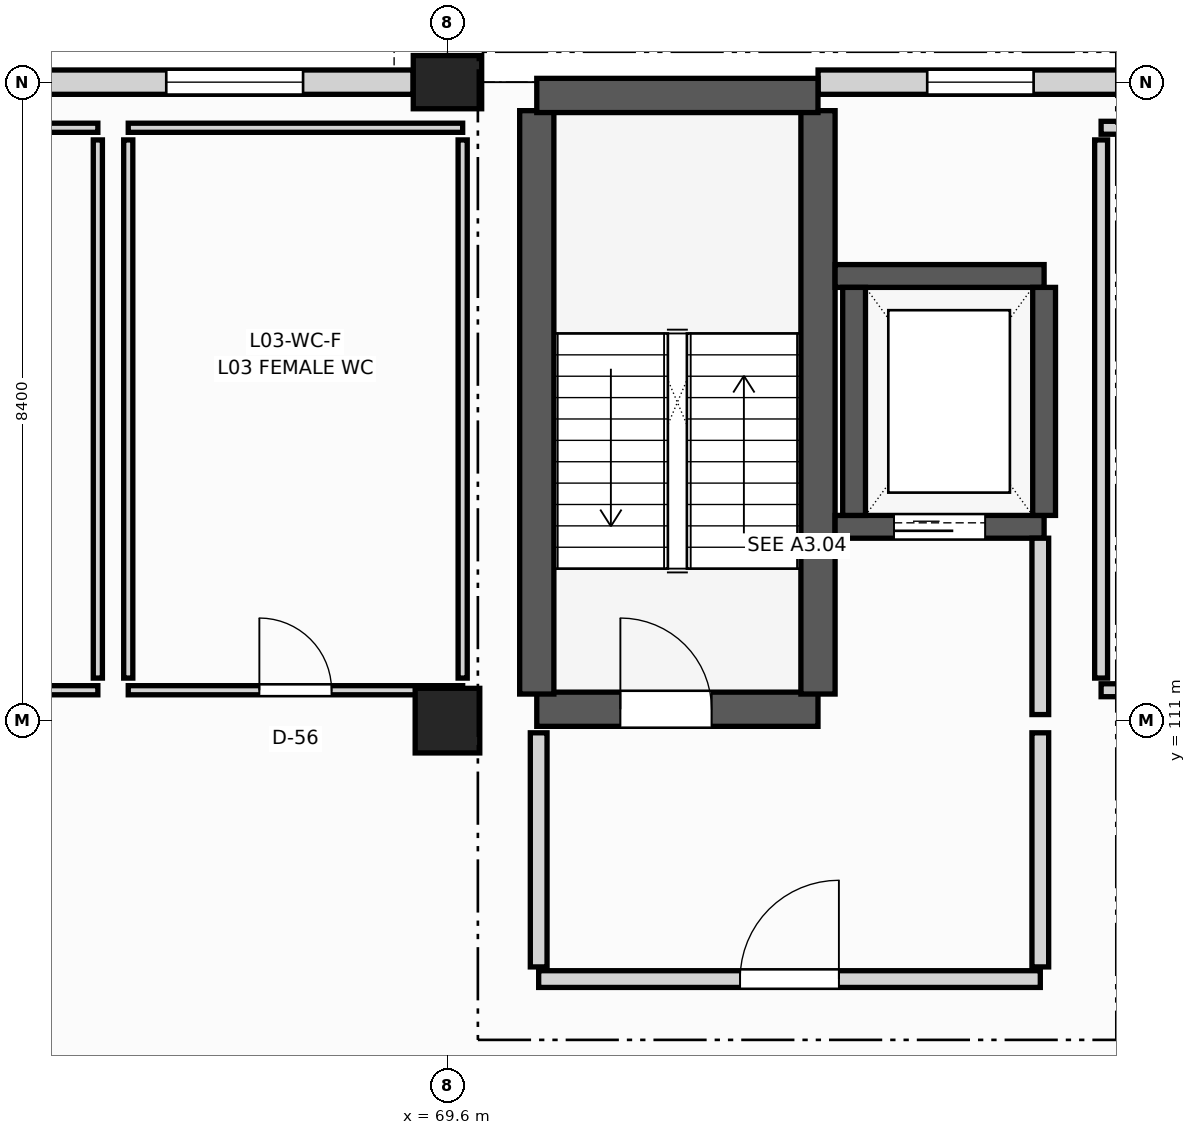
"""IFC4 building model, lengths in metres.
Left out: names, types, materials, properties, quantities, classifications, styles, units other than length and angle.
Written with IfcOpenShell. Run it as: python <this file> out.ifc"""

import sys

from ifc_helpers import new_model, si_unit, direction, frame, frame_2d, origin, origin_2d, place, context, subcontext, project, spatial, rectangle, extrude, element, fill, save


model = new_model("IFC4")
c1 = context("Model", 3, precision=1e-05, world=origin(), true_north=direction((0.0, 1.0)))
c2 = subcontext(c1, "Body", "Model", "MODEL_VIEW")
j1 = project(units=[si_unit("LENGTHUNIT", "METRE"), si_unit("PLANEANGLEUNIT", "RADIAN")], contexts=[c1])
p1 = place(None, origin())
s1 = spatial("IfcSite", under=j1, at=p1, CompositionType="ELEMENT")
p2 = place(p1, origin())
s2 = spatial("IfcBuilding", under=s1, at=p2, CompositionType="ELEMENT")
p3 = place(p2, frame((0.0, 0.0, 14.1)))
s3 = spatial("IfcBuildingStorey", under=s2, at=p3, CompositionType="ELEMENT", Elevation=14.1)
p4 = place(p3, frame((69.6, 111.0, 0.0), z_axis=(0.0, 0.0, 1.0), x_axis=(1.0, 0.0, 0.0)))
e1 = element("IfcColumn", 1, at=p4, inside=s3, PredefinedType="COLUMN", context=c2, shape_type="SweptSolid", body=[
    extrude(rectangle(XDim=0.85, YDim=0.85, at=origin_2d()), origin(), (0.0, 0.0, 1.0), 3.9),
])
p5 = place(p3, frame((69.6, 119.4, 0.0), z_axis=(0.0, 0.0, 1.0), x_axis=(1.0, 0.0, 0.0)))
e2 = element("IfcColumn", 2, at=p5, inside=s3, PredefinedType="COLUMN", context=c2, shape_type="SweptSolid", body=[
    extrude(rectangle(XDim=0.9, YDim=0.7, at=origin_2d()), origin(), (0.0, 0.0, 1.0), 3.9),
])
p6 = place(p3, frame((60.452, 119.4, 0.0), z_axis=(0.0, 0.0, 1.0), x_axis=(1.0, 0.0, 0.0)))
e3 = element("IfcWall", 3, at=p6, inside=s3, PredefinedType="SOLIDWALL", context=c2, shape_type="SweptSolid", body=[
    extrude(rectangle(XDim=8.696, YDim=0.32, at=frame_2d((4.348, 0.0))), origin(), (0.0, 0.0, 1.0), 3.08),
])
p7 = place(p6, frame((1.448, 0.0, 0.85)))
e4 = element("IfcOpeningElement", 4, at=p7, cuts=e3, PredefinedType="OPENING", context=c2, shape_type="SweptSolid", body=[
    extrude(rectangle(XDim=1.8, YDim=1.9, at=frame_2d((0.9, 0.95))), frame((0.0, 0.17, 0.0), z_axis=(0.0, -1.0, 0.0), x_axis=(1.0, 0.0, 0.0)), (0.0, 0.0, 1.0), 0.34),
])
p8 = place(p6, frame((5.448, 0.0, 0.85)))
e5 = element("IfcOpeningElement", 5, at=p8, cuts=e3, PredefinedType="OPENING", context=c2, shape_type="SweptSolid", body=[
    extrude(rectangle(XDim=1.8, YDim=1.9, at=frame_2d((0.9, 0.95))), frame((0.0, 0.17, 0.0), z_axis=(0.0, -1.0, 0.0), x_axis=(1.0, 0.0, 0.0)), (0.0, 0.0, 1.0), 0.34),
])
p9 = place(p3, frame((74.476, 119.4, 0.0), z_axis=(0.0, 0.0, 1.0), x_axis=(1.0, 0.0, 0.0)))
e6 = element("IfcWall", 6, at=p9, inside=s3, PredefinedType="SOLIDWALL", context=c2, shape_type="SweptSolid", body=[
    extrude(rectangle(XDim=4.272, YDim=0.32, at=frame_2d((2.136, 0.0))), origin(), (0.0, 0.0, 1.0), 3.08),
])
p10 = place(p9, frame((1.436, 0.0, 0.9)))
e7 = element("IfcOpeningElement", 7, at=p10, cuts=e6, PredefinedType="OPENING", context=c2, shape_type="SweptSolid", body=[
    extrude(rectangle(XDim=1.4, YDim=1.65, at=frame_2d((0.7, 0.825))), frame((0.0, 0.17, 0.0), z_axis=(0.0, -1.0, 0.0), x_axis=(1.0, 0.0, 0.0)), (0.0, 0.0, 1.0), 0.34),
])
p11 = place(p3, frame((70.775, 111.15, 0.0), z_axis=(0.0, 0.0, 1.0), x_axis=(1.0, 0.0, 0.0)))
e8 = element("IfcWall", 8, at=p11, inside=s3, PredefinedType="SHEAR", context=c2, shape_type="SweptSolid", body=[
    extrude(rectangle(XDim=3.7, YDim=0.45, at=frame_2d((1.85, 0.0))), origin(), (0.0, 0.0, 1.0), 3.9),
])
p12 = place(p11, frame((1.1, 0.0, 0.0)))
e9 = element("IfcOpeningElement", 9, at=p12, cuts=e8, PredefinedType="OPENING", context=c2, shape_type="SweptSolid", body=[
    extrude(rectangle(XDim=1.2, YDim=2.2, at=frame_2d((0.6, 1.1))), frame((0.0, 0.235, 0.0), z_axis=(0.0, -1.0, 0.0), x_axis=(1.0, 0.0, 0.0)), (0.0, 0.0, 1.0), 0.47),
])
for number, where, z_axis, x_axis in (
    (10, (70.775, 111.35, 0.0), (0.0, 0.0, 1.0), (0.0, 1.0, 0.0)),
    (11, (74.475, 111.35, 0.0), (0.0, 0.0, 1.0), (0.0, 1.0, 0.0)),
):
    element("IfcWall", number, at=place(p3, frame(where, z_axis=z_axis, x_axis=x_axis)), inside=s3, PredefinedType="SHEAR", context=c2, shape_type="SweptSolid", body=[
        extrude(rectangle(XDim=7.675, YDim=0.45, at=frame_2d((3.837, 0.0))), origin(), (0.0, 0.0, 1.0), 3.9),
    ])
p13 = place(p3, frame((70.775, 119.225, 0.0), z_axis=(0.0, 0.0, 1.0), x_axis=(1.0, 0.0, 0.0)))
e12 = element("IfcWall", 12, at=p13, inside=s3, PredefinedType="SHEAR", context=c2, shape_type="SweptSolid", body=[
    extrude(rectangle(XDim=3.7, YDim=0.45, at=frame_2d((1.85, 0.0))), origin(), (0.0, 0.0, 1.0), 3.9),
])
p14 = place(p3, frame((74.7, 113.55, 0.0), z_axis=(0.0, 0.0, 1.0), x_axis=(1.0, 0.0, 0.0)))
e13 = element("IfcWall", 13, at=p14, inside=s3, PredefinedType="SHEAR", context=c2, shape_type="SweptSolid", body=[
    extrude(rectangle(XDim=2.75, YDim=0.3, at=frame_2d((1.375, 0.0))), origin(), (0.0, 0.0, 1.0), 3.9),
])
p15 = place(p14, frame((0.775, 0.0, 0.0)))
e14 = element("IfcOpeningElement", 14, at=p15, cuts=e13, PredefinedType="OPENING", context=c2, shape_type="SweptSolid", body=[
    extrude(rectangle(XDim=1.2, YDim=2.2, at=frame_2d((0.6, 1.1))), frame((0.0, 0.16, 0.0), z_axis=(0.0, -1.0, 0.0), x_axis=(1.0, 0.0, 0.0)), (0.0, 0.0, 1.0), 0.32),
])
p16 = place(p3, frame((74.7, 116.85, 0.0), z_axis=(0.0, 0.0, 1.0), x_axis=(1.0, 0.0, 0.0)))
e15 = element("IfcWall", 15, at=p16, inside=s3, PredefinedType="SHEAR", context=c2, shape_type="SweptSolid", body=[
    extrude(rectangle(XDim=2.75, YDim=0.3, at=frame_2d((1.375, 0.0))), origin(), (0.0, 0.0, 1.0), 3.9),
])
for number, where, z_axis, x_axis in (
    (16, (74.95, 113.7, 0.0), (0.0, 0.0, 1.0), (0.0, 1.0, 0.0)),
    (17, (77.45, 113.7, 0.0), (0.0, 0.0, 1.0), (0.0, 1.0, 0.0)),
):
    element("IfcWall", number, at=place(p3, frame(where, z_axis=z_axis, x_axis=x_axis)), inside=s3, PredefinedType="SHEAR", context=c2, shape_type="SweptSolid", body=[
        extrude(rectangle(XDim=3.0, YDim=0.3, at=frame_2d((1.5, 0.0))), origin(), (0.0, 0.0, 1.0), 3.9),
    ])
p17 = place(p3, frame((70.8, 107.6, 0.0), z_axis=(0.0, 0.0, 1.0), x_axis=(1.0, 0.0, 0.0)))
e18 = element("IfcWall", 18, at=p17, inside=s3, PredefinedType="PARTITIONING", context=c2, shape_type="SweptSolid", body=[
    extrude(rectangle(XDim=6.6, YDim=0.22, at=frame_2d((3.3, 0.0))), origin(), (0.0, 0.0, 1.0), 3.15),
])
p18 = place(p17, frame((2.65, 0.0, 0.0)))
e19 = element("IfcOpeningElement", 19, at=p18, cuts=e18, PredefinedType="OPENING", context=c2, shape_type="SweptSolid", body=[
    extrude(rectangle(XDim=1.3, YDim=2.2, at=frame_2d((0.65, 1.1))), frame((0.0, 0.12, 0.0), z_axis=(0.0, -1.0, 0.0), x_axis=(1.0, 0.0, 0.0)), (0.0, 0.0, 1.0), 0.24),
])
p19 = place(p3, frame((77.4, 111.08, 0.0), z_axis=(0.0, 0.0, 1.0), x_axis=(0.0, 1.0, 0.0)))
e20 = element("IfcWall", 20, at=p19, inside=s3, PredefinedType="PARTITIONING", context=c2, shape_type="SweptSolid", body=[
    extrude(rectangle(XDim=2.32, YDim=0.22, at=frame_2d((1.16, 0.0))), origin(), (0.0, 0.0, 1.0), 3.15),
])
for number, where, z_axis, x_axis in (
    (21, (70.8, 107.76, 0.0), (0.0, 0.0, 1.0), (0.0, 1.0, 0.0)),
    (22, (77.4, 107.76, 0.0), (0.0, 0.0, 1.0), (0.0, 1.0, 0.0)),
):
    element("IfcWall", number, at=place(p3, frame(where, z_axis=z_axis, x_axis=x_axis)), inside=s3, PredefinedType="PARTITIONING", context=c2, shape_type="SweptSolid", body=[
        extrude(rectangle(XDim=3.08, YDim=0.22, at=frame_2d((1.54, 0.0))), origin(), (0.0, 0.0, 1.0), 3.15),
    ])
p20 = place(p3, frame((78.2, 111.4, 0.0), z_axis=(0.0, 0.0, 1.0), x_axis=(1.0, 0.0, 0.0)))
e23 = element("IfcWall", 23, at=p20, inside=s3, PredefinedType="PARTITIONING", context=c2, shape_type="SweptSolid", body=[
    extrude(rectangle(XDim=21.4, YDim=0.17, at=frame_2d((10.7, 0.0))), origin(), (0.0, 0.0, 1.0), 3.15),
])
p21 = place(p20, frame((6.94, 0.0, 0.0)))
e24 = element("IfcOpeningElement", 24, at=p21, cuts=e23, PredefinedType="OPENING", context=c2, shape_type="SweptSolid", body=[
    extrude(rectangle(XDim=1.1, YDim=2.2, at=frame_2d((0.55, 1.1))), frame((0.0, 0.095, 0.0), z_axis=(0.0, -1.0, 0.0), x_axis=(1.0, 0.0, 0.0)), (0.0, 0.0, 1.0), 0.19),
])
p22 = place(p3, frame((78.2, 118.8, 0.0), z_axis=(0.0, 0.0, 1.0), x_axis=(1.0, 0.0, 0.0)))
e25 = element("IfcWall", 25, at=p22, inside=s3, PredefinedType="PARTITIONING", context=c2, shape_type="SweptSolid", body=[
    extrude(rectangle(XDim=21.4, YDim=0.17, at=frame_2d((10.7, 0.0))), origin(), (0.0, 0.0, 1.0), 3.15),
])
p23 = place(p3, frame((78.2, 111.56, 0.0), z_axis=(0.0, 0.0, 1.0), x_axis=(0.0, 1.0, 0.0)))
e26 = element("IfcWall", 26, at=p23, inside=s3, PredefinedType="PARTITIONING", context=c2, shape_type="SweptSolid", body=[
    extrude(rectangle(XDim=7.08, YDim=0.17, at=frame_2d((3.54, 0.0))), origin(), (0.0, 0.0, 1.0), 3.15),
])
p24 = place(p3, frame((60.8, 111.4, 0.0), z_axis=(0.0, 0.0, 1.0), x_axis=(1.0, 0.0, 0.0)))
e27 = element("IfcWall", 27, at=p24, inside=s3, PredefinedType="PARTITIONING", context=c2, shape_type="SweptSolid", body=[
    extrude(rectangle(XDim=4.2, YDim=0.12, at=frame_2d((2.1, 0.0))), origin(), (0.0, 0.0, 1.0), 3.15),
])
p25 = place(p24, frame((1.625, 0.0, 0.0)))
e28 = element("IfcOpeningElement", 28, at=p25, cuts=e27, PredefinedType="OPENING", context=c2, shape_type="SweptSolid", body=[
    extrude(rectangle(XDim=0.95, YDim=2.1, at=frame_2d((0.475, 1.05))), frame((0.0, 0.07, 0.0), z_axis=(0.0, -1.0, 0.0), x_axis=(1.0, 0.0, 0.0)), (0.0, 0.0, 1.0), 0.14),
])
p26 = place(p3, frame((60.8, 118.8, 0.0), z_axis=(0.0, 0.0, 1.0), x_axis=(1.0, 0.0, 0.0)))
e29 = element("IfcWall", 29, at=p26, inside=s3, PredefinedType="PARTITIONING", context=c2, shape_type="SweptSolid", body=[
    extrude(rectangle(XDim=4.2, YDim=0.12, at=frame_2d((2.1, 0.0))), origin(), (0.0, 0.0, 1.0), 3.15),
])
p27 = place(p3, frame((65.0, 111.56, 0.0), z_axis=(0.0, 0.0, 1.0), x_axis=(0.0, 1.0, 0.0)))
e30 = element("IfcWall", 30, at=p27, inside=s3, PredefinedType="PARTITIONING", context=c2, shape_type="SweptSolid", body=[
    extrude(rectangle(XDim=7.08, YDim=0.12, at=frame_2d((3.54, 0.0))), origin(), (0.0, 0.0, 1.0), 3.15),
])
p28 = place(p3, frame((65.4, 111.4, 0.0), z_axis=(0.0, 0.0, 1.0), x_axis=(1.0, 0.0, 0.0)))
e31 = element("IfcWall", 31, at=p28, inside=s3, PredefinedType="PARTITIONING", context=c2, shape_type="SweptSolid", body=[
    extrude(rectangle(XDim=4.4, YDim=0.12, at=frame_2d((2.2, 0.0))), origin(), (0.0, 0.0, 1.0), 3.15),
])
p29 = place(p28, frame((1.725, 0.0, 0.0)))
e32 = element("IfcOpeningElement", 32, at=p29, cuts=e31, PredefinedType="OPENING", context=c2, shape_type="SweptSolid", body=[
    extrude(rectangle(XDim=0.95, YDim=2.1, at=frame_2d((0.475, 1.05))), frame((0.0, 0.07, 0.0), z_axis=(0.0, -1.0, 0.0), x_axis=(1.0, 0.0, 0.0)), (0.0, 0.0, 1.0), 0.14),
])
p30 = place(p3, frame((65.4, 118.8, 0.0), z_axis=(0.0, 0.0, 1.0), x_axis=(1.0, 0.0, 0.0)))
e33 = element("IfcWall", 33, at=p30, inside=s3, PredefinedType="PARTITIONING", context=c2, shape_type="SweptSolid", body=[
    extrude(rectangle(XDim=4.4, YDim=0.12, at=frame_2d((2.2, 0.0))), origin(), (0.0, 0.0, 1.0), 3.15),
])
for number, where, z_axis, x_axis in (
    (34, (65.4, 111.56, 0.0), (0.0, 0.0, 1.0), (0.0, 1.0, 0.0)),
    (35, (69.8, 111.56, 0.0), (0.0, 0.0, 1.0), (0.0, 1.0, 0.0)),
):
    element("IfcWall", number, at=place(p3, frame(where, z_axis=z_axis, x_axis=x_axis)), inside=s3, PredefinedType="PARTITIONING", context=c2, shape_type="SweptSolid", body=[
        extrude(rectangle(XDim=7.08, YDim=0.12, at=frame_2d((3.54, 0.0))), origin(), (0.0, 0.0, 1.0), 3.15),
    ])
p31 = place(p8, origin())
e36 = element("IfcWindow", 36, at=p31, inside=s3, PartitioningType="SINGLE_PANEL", PredefinedType="WINDOW", context=c2, shape_type="SweptSolid", body=[
    extrude(rectangle(XDim=1.8, YDim=1.9, at=frame_2d((0.9, 0.95))), frame((0.0, 0.03, 0.0), z_axis=(0.0, -1.0, 0.0), x_axis=(1.0, 0.0, 0.0)), (0.0, 0.0, 1.0), 0.06),
])
fill(e5, e36)
p32 = place(p10, origin())
e37 = element("IfcWindow", 37, at=p32, inside=s3, PartitioningType="SINGLE_PANEL", PredefinedType="WINDOW", context=c2, shape_type="SweptSolid", body=[
    extrude(rectangle(XDim=1.4, YDim=1.65, at=frame_2d((0.7, 0.825))), frame((0.0, 0.03, 0.0), z_axis=(0.0, -1.0, 0.0), x_axis=(1.0, 0.0, 0.0)), (0.0, 0.0, 1.0), 0.06),
])
fill(e7, e37)
p33 = place(p12, origin())
e38 = element("IfcDoor", 38, at=p33, inside=s3, OperationType="SINGLE_SWING_LEFT", PredefinedType="DOOR", context=c2, shape_type="SweptSolid", body=[
    extrude(rectangle(XDim=1.2, YDim=2.2, at=frame_2d((0.6, 1.1))), frame((0.0, 0.025, 0.0), z_axis=(0.0, -1.0, 0.0), x_axis=(1.0, 0.0, 0.0)), (0.0, 0.0, 1.0), 0.05),
])
fill(e9, e38)
p34 = place(p15, origin())
e39 = element("IfcDoor", 39, at=p34, inside=s3, OperationType="SLIDING_TO_LEFT", PredefinedType="DOOR", context=c2, shape_type="SweptSolid", body=[
    extrude(rectangle(XDim=1.2, YDim=2.2, at=frame_2d((0.6, 1.1))), frame((0.0, 0.025, 0.0), z_axis=(0.0, -1.0, 0.0), x_axis=(1.0, 0.0, 0.0)), (0.0, 0.0, 1.0), 0.05),
])
fill(e14, e39)
p35 = place(p18, origin())
e40 = element("IfcDoor", 40, at=p35, inside=s3, OperationType="SINGLE_SWING_RIGHT", PredefinedType="DOOR", context=c2, shape_type="SweptSolid", body=[
    extrude(rectangle(XDim=1.3, YDim=2.2, at=frame_2d((0.65, 1.1))), frame((0.0, 0.025, 0.0), z_axis=(0.0, -1.0, 0.0), x_axis=(1.0, 0.0, 0.0)), (0.0, 0.0, 1.0), 0.05),
])
fill(e19, e40)
p36 = place(p29, origin())
e41 = element("IfcDoor", 41, at=p36, inside=s3, OperationType="SINGLE_SWING_LEFT", PredefinedType="DOOR", context=c2, shape_type="SweptSolid", body=[
    extrude(rectangle(XDim=0.95, YDim=2.1, at=frame_2d((0.475, 1.05))), frame((0.0, 0.025, 0.0), z_axis=(0.0, -1.0, 0.0), x_axis=(1.0, 0.0, 0.0)), (0.0, 0.0, 1.0), 0.05),
])
fill(e32, e41)
save(model, sys.argv[1])
